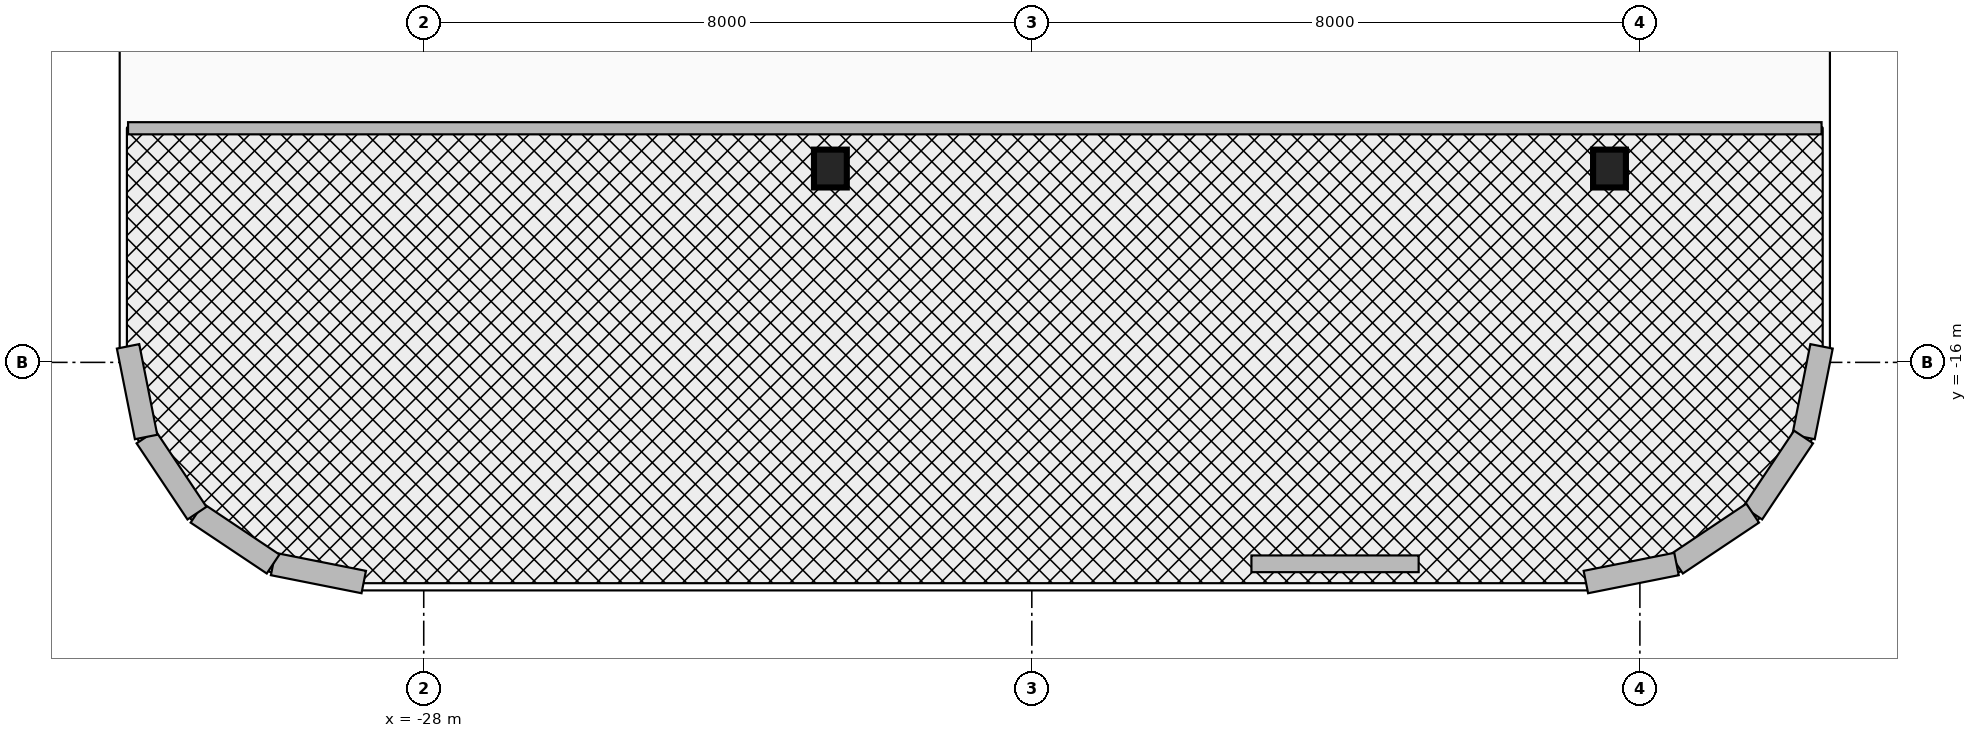
"""IFC4 building model, lengths in metres.
Left out: names, types, materials, properties, quantities, classifications, styles, units other than length and angle.
Written with IfcOpenShell. Run it as: python <this file> out.ifc"""

import sys

from ifc_helpers import new_model, si_unit, direction, frame, frame_2d, origin, origin_2d, place, context, subcontext, project, spatial, rectangle, i_section, extrude, source, transform, mapped, element, fill, save


model = new_model("IFC4")
c1 = context("Model", 3, precision=1e-05, world=origin(), true_north=direction((0.0, 1.0)))
c2 = subcontext(c1, "Body", "Model", "MODEL_VIEW")
j1 = project(units=[si_unit("LENGTHUNIT", "METRE"), si_unit("PLANEANGLEUNIT", "RADIAN")], contexts=[c1])
p1 = place(None, origin())
s1 = spatial("IfcSite", under=j1, at=p1, CompositionType="ELEMENT")
p2 = place(p1, origin())
s2 = spatial("IfcBuilding", under=s1, at=p2, CompositionType="ELEMENT")
p3 = place(p2, frame((0.0, 0.0, 48.2)))
s3 = spatial("IfcBuildingStorey", under=s2, at=p3, CompositionType="ELEMENT", Elevation=48.2)
m1 = source(origin(), c2, "Body", "SweptSolid", [
    extrude(i_section(OverallWidth=0.432, OverallDepth=0.498, WebThickness=0.056, FlangeThickness=0.089, at=origin_2d()), origin(), (0.0, 0.0, 1.0), 3.7),
])
for number, where, z_axis, x_axis in (
    (1, (-22.65, -13.45, 0.0), (0.0, 0.0, 1.0), (1.0, 0.0, 0.0)),
    (2, (-12.4, -13.45, 0.0), (0.0, 0.0, 1.0), (1.0, 0.0, 0.0)),
):
    element("IfcColumn", number, at=place(p3, frame(where, z_axis=z_axis, x_axis=x_axis)), inside=s3, PredefinedType="COLUMN", context=c2, shape_type="MappedRepresentation", body=[
        mapped(m1, transform((0.0, 0.0, 0.0), x_axis=(1.0, 0.0, 0.0), y_axis=(0.0, 1.0, 0.0), z_axis=(0.0, 0.0, 1.0), scale=1.0)),
    ])
p4 = place(p3, frame((-9.61, -15.789, 0.0), z_axis=(0.0, 0.0, 1.0), x_axis=(-0.194996050505, -0.980804027463, 0.0)))
e3 = element("IfcWall", 3, at=p4, inside=s3, PredefinedType="SOLIDWALL", context=c2, shape_type="SweptSolid", body=[
    extrude(rectangle(XDim=1.216, YDim=0.3, at=frame_2d((0.608, 0.0))), origin(), (0.0, 0.0, 1.0), 3.46),
])
for number, where, z_axis, x_axis in (
    (4, (-9.847, -16.982, 0.0), (0.0, 0.0, 1.0), (-0.556, -0.831, 0.0)),
    (5, (-10.517, -17.983, 0.0), (0.0, 0.0, 1.0), (-0.831, -0.556, 0.0)),
):
    element("IfcWall", number, at=place(p3, frame(where, z_axis=z_axis, x_axis=x_axis)), inside=s3, PredefinedType="SOLIDWALL", context=c2, shape_type="SweptSolid", body=[
        extrude(rectangle(XDim=1.205, YDim=0.3, at=frame_2d((0.603, 0.0))), origin(), (0.0, 0.0, 1.0), 3.46),
    ])
p5 = place(p3, frame((-11.518, -18.653, 0.0), z_axis=(0.0, 0.0, 1.0), x_axis=(-0.980804027463, -0.194996050505, 0.0)))
e6 = element("IfcWall", 6, at=p5, inside=s3, PredefinedType="SOLIDWALL", context=c2, shape_type="SweptSolid", body=[
    extrude(rectangle(XDim=1.216, YDim=0.3, at=frame_2d((0.608, 0.0))), origin(), (0.0, 0.0, 1.0), 3.46),
])
p6 = place(p3, frame((-14.911, -18.65, 0.0), z_axis=(0.0, 0.0, 1.0), x_axis=(-1.0, 0.0, 0.0)))
e7 = element("IfcWall", 7, at=p6, inside=s3, PredefinedType="SOLIDWALL", context=c2, shape_type="SweptSolid", body=[
    extrude(rectangle(XDim=2.2, YDim=0.22, at=frame_2d((1.1, 0.0))), origin(), (0.0, 0.0, 1.0), 3.46),
])
p7 = place(p6, frame((0.65, 0.0, 0.95)))
e8 = element("IfcOpeningElement", 8, at=p7, cuts=e7, PredefinedType="OPENING", context=c2, shape_type="SweptSolid", body=[
    extrude(rectangle(XDim=0.9, YDim=1.3, at=frame_2d((0.45, 0.65))), frame((0.0, 0.125, 0.0), z_axis=(0.0, -1.0, 0.0), x_axis=(1.0, 0.0, 0.0)), (0.0, 0.0, 1.0), 0.25),
])
p8 = place(p3, frame((-28.789, -18.89, 0.0), z_axis=(0.0, 0.0, 1.0), x_axis=(-0.980804027463, 0.194996050505, 0.0)))
e9 = element("IfcWall", 9, at=p8, inside=s3, PredefinedType="SOLIDWALL", context=c2, shape_type="SweptSolid", body=[
    extrude(rectangle(XDim=1.216, YDim=0.3, at=frame_2d((0.608, 0.0))), origin(), (0.0, 0.0, 1.0), 3.46),
])
for number, where, z_axis, x_axis in (
    (10, (-29.982, -18.653, 0.0), (0.0, 0.0, 1.0), (-0.831, 0.556, 0.0)),
    (11, (-30.983, -17.983, 0.0), (0.0, 0.0, 1.0), (-0.556, 0.831, 0.0)),
):
    element("IfcWall", number, at=place(p3, frame(where, z_axis=z_axis, x_axis=x_axis)), inside=s3, PredefinedType="SOLIDWALL", context=c2, shape_type="SweptSolid", body=[
        extrude(rectangle(XDim=1.205, YDim=0.3, at=frame_2d((0.603, 0.0))), origin(), (0.0, 0.0, 1.0), 3.46),
    ])
p9 = place(p3, frame((-31.653, -16.982, 0.0), z_axis=(0.0, 0.0, 1.0), x_axis=(-0.194996050505, 0.980804027463, 0.0)))
e12 = element("IfcWall", 12, at=p9, inside=s3, PredefinedType="SOLIDWALL", context=c2, shape_type="SweptSolid", body=[
    extrude(rectangle(XDim=1.216, YDim=0.3, at=frame_2d((0.608, 0.0))), origin(), (0.0, 0.0, 1.0), 3.46),
])
p10 = place(p3, frame((-31.89, -12.92, 0.0), z_axis=(0.0, 0.0, 1.0), x_axis=(1.0, 0.0, 0.0)))
e13 = element("IfcWall", 13, at=p10, inside=s3, PredefinedType="PARTITIONING", context=c2, shape_type="SweptSolid", body=[
    extrude(rectangle(XDim=22.28, YDim=0.16, at=frame_2d((11.14, 0.0))), origin(), (0.0, 0.0, 1.0), 2.834),
])
p11 = place(p10, frame((10.69, 0.0, 0.0)))
e14 = element("IfcOpeningElement", 14, at=p11, cuts=e13, PredefinedType="OPENING", context=c2, shape_type="SweptSolid", body=[
    extrude(rectangle(XDim=0.9, YDim=2.1, at=frame_2d((0.45, 1.05))), frame((0.0, 0.095, 0.0), z_axis=(0.0, -1.0, 0.0), x_axis=(1.0, 0.0, 0.0)), (0.0, 0.0, 1.0), 0.19),
])
p12 = place(p7, origin())
e15 = element("IfcWindow", 15, at=p12, inside=s3, PartitioningType="SINGLE_PANEL", PredefinedType="WINDOW", context=c2, shape_type="SweptSolid", body=[
    extrude(rectangle(XDim=0.9, YDim=1.3, at=frame_2d((0.45, 0.65))), frame((0.0, 0.03, 0.0), z_axis=(0.0, -1.0, 0.0), x_axis=(1.0, 0.0, 0.0)), (0.0, 0.0, 1.0), 0.06),
])
fill(e8, e15)
p13 = place(p11, origin())
e16 = element("IfcDoor", 16, at=p13, inside=s3, OperationType="SINGLE_SWING_RIGHT", PredefinedType="DOOR", context=c2, shape_type="SweptSolid", body=[
    extrude(rectangle(XDim=0.9, YDim=2.1, at=frame_2d((0.45, 1.05))), frame((0.0, 0.025, 0.0), z_axis=(0.0, -1.0, 0.0), x_axis=(1.0, 0.0, 0.0)), (0.0, 0.0, 1.0), 0.05),
])
fill(e14, e16)
save(model, sys.argv[1])
